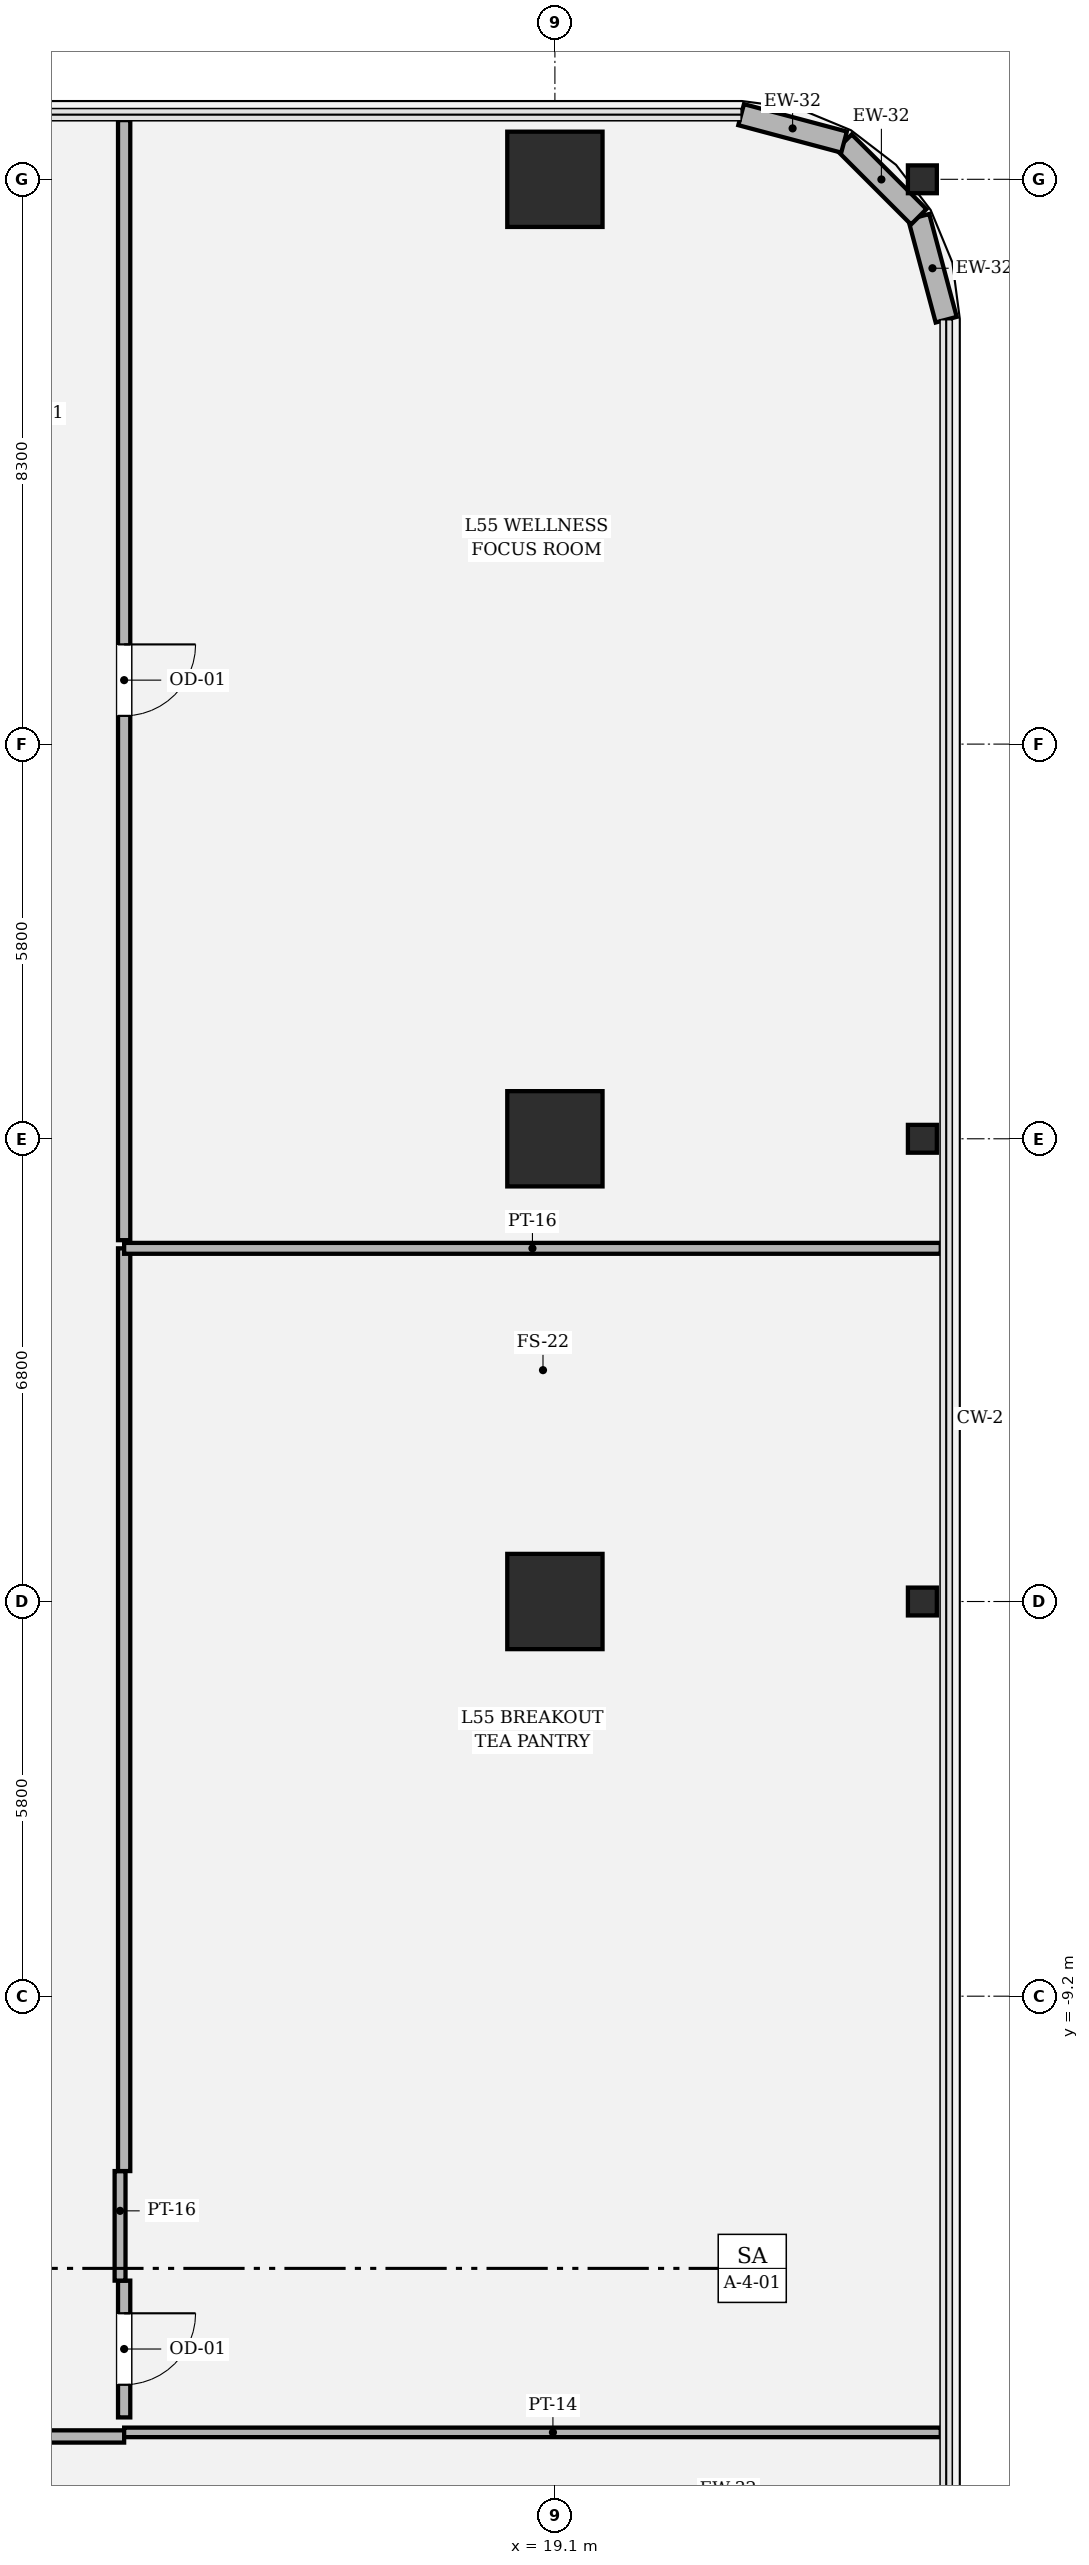
"""IFC4 building model, lengths in metres.
Left out: names, types, materials, properties, quantities, classifications, styles, units other than length and angle.
Written with IfcOpenShell. Run it as: python <this file> out.ifc"""

import sys

from ifc_helpers import new_model, si_unit, direction, frame, frame_2d, origin, origin_2d, place, context, subcontext, project, spatial, rectangle, hollow_rectangle, i_section, extrude, element, fill, save


model = new_model("IFC4")
c1 = context("Model", 3, precision=1e-05, world=origin(), true_north=direction((0.0, 1.0)))
c2 = subcontext(c1, "Body", "Model", "MODEL_VIEW")
j1 = project(units=[si_unit("LENGTHUNIT", "METRE"), si_unit("PLANEANGLEUNIT", "RADIAN")], contexts=[c1])
p1 = place(None, origin())
s1 = spatial("IfcSite", under=j1, at=p1, CompositionType="ELEMENT")
p2 = place(p1, origin())
s2 = spatial("IfcBuilding", under=s1, at=p2, CompositionType="ELEMENT")
p3 = place(p2, frame((0.0, 0.0, 232.95)))
s3 = spatial("IfcBuildingStorey", under=s2, at=p3, CompositionType="ELEMENT", Elevation=232.95)
for number, where, z_axis, x_axis in (
    (1, (19.1, -3.4, 0.0), (0.0, 0.0, 1.0), (1.0, 0.0, 0.0)),
    (2, (19.1, 3.4, 0.0), (0.0, 0.0, 1.0), (1.0, 0.0, 0.0)),
    (3, (19.1, 17.5, 0.0), (0.0, 0.0, 1.0), (1.0, 0.0, 0.0)),
):
    element("IfcColumn", number, at=place(p3, frame(where, z_axis=z_axis, x_axis=x_axis)), inside=s3, PredefinedType="COLUMN", context=c2, shape_type="SweptSolid", body=[
        extrude(hollow_rectangle(XDim=1.4, YDim=1.4, WallThickness=0.042, at=origin_2d()), origin(), (0.0, 0.0, 1.0), 4.05),
    ])
for number, where, z_axis, x_axis in (
    (4, (24.5, -3.4, 0.0), (0.0, 0.0, 1.0), (0.0, 1.0, 0.0)),
    (5, (24.5, 3.4, 0.0), (0.0, 0.0, 1.0), (0.0, 1.0, 0.0)),
    (6, (24.5, 17.5, 0.0), (0.0, 0.0, 1.0), (0.0, 1.0, 0.0)),
):
    element("IfcColumn", number, at=place(p3, frame(where, z_axis=z_axis, x_axis=x_axis)), inside=s3, PredefinedType="COLUMN", context=c2, shape_type="SweptSolid", body=[
        extrude(i_section(OverallWidth=0.409, OverallDepth=0.425, WebThickness=0.032, FlangeThickness=0.052, FilletRadius=0.018, at=origin_2d()), origin(), (0.0, 0.0, 1.0), 4.048),
    ])
p4 = place(p3, frame((24.85, 15.437, 0.0), z_axis=(0.0, 0.0, 1.0), x_axis=(-0.257847112249, 0.966185730957, 0.0)))
e7 = element("IfcWall", 7, at=p4, inside=s3, PredefinedType="SOLIDWALL", context=c2, shape_type="SweptSolid", body=[
    extrude(rectangle(XDim=1.565, YDim=0.32, at=frame_2d((0.783, 0.0))), origin(), (0.0, 0.0, 1.0), 3.73),
])
p5 = place(p3, frame((24.447, 16.949, 0.0), z_axis=(0.0, 0.0, 1.0), x_axis=(-0.707106781187, 0.707106781187, 0.0)))
e8 = element("IfcWall", 8, at=p5, inside=s3, PredefinedType="SOLIDWALL", context=c2, shape_type="SweptSolid", body=[
    extrude(rectangle(XDim=1.552, YDim=0.32, at=frame_2d((0.776, 0.0))), origin(), (0.0, 0.0, 1.0), 3.73),
])
p6 = place(p3, frame((23.349, 18.047, 0.0), z_axis=(0.0, 0.0, 1.0), x_axis=(-0.966224582397, 0.257701486942, 0.0)))
e9 = element("IfcWall", 9, at=p6, inside=s3, PredefinedType="SOLIDWALL", context=c2, shape_type="SweptSolid", body=[
    extrude(rectangle(XDim=1.565, YDim=0.32, at=frame_2d((0.783, 0.0))), origin(), (0.0, 0.0, 1.0), 3.73),
])
p7 = place(p3, frame((1.2, -15.67, 0.0), z_axis=(0.0, 0.0, 1.0), x_axis=(1.0, 0.0, 0.0)))
e10 = element("IfcWall", 10, at=p7, inside=s3, PredefinedType="PARTITIONING", context=c2, shape_type="SweptSolid", body=[
    extrude(rectangle(XDim=11.57, YDim=0.18, at=frame_2d((5.785, 0.0))), origin(), (0.0, 0.0, 1.0), 2.404),
])
p8 = place(p3, frame((12.77, -15.61, 0.0), z_axis=(0.0, 0.0, 1.0), x_axis=(1.0, 0.0, 0.0)))
e11 = element("IfcWall", 11, at=p8, inside=s3, PredefinedType="PARTITIONING", context=c2, shape_type="SweptSolid", body=[
    extrude(rectangle(XDim=12.0, YDim=0.14, at=frame_2d((6.0, 0.0))), origin(), (0.0, 0.0, 1.0), 2.404),
])
p9 = place(p3, frame((12.77, -15.39, 0.0), z_axis=(0.0, 0.0, 1.0), x_axis=(0.0, 1.0, 0.0)))
e12 = element("IfcWall", 12, at=p9, inside=s3, PredefinedType="PARTITIONING", context=c2, shape_type="SweptSolid", body=[
    extrude(rectangle(XDim=2.01, YDim=0.18, at=frame_2d((1.005, 0.0))), origin(), (0.0, 0.0, 1.0), 2.444),
])
p10 = place(p9, frame((0.48, 0.0, 0.0)))
e13 = element("IfcOpeningElement", 13, at=p10, cuts=e12, PredefinedType="OPENING", context=c2, shape_type="SweptSolid", body=[
    extrude(rectangle(XDim=1.05, YDim=2.2, at=frame_2d((0.525, 1.1))), frame((0.0, 0.1, 0.0), z_axis=(0.0, -1.0, 0.0), x_axis=(1.0, 0.0, 0.0)), (0.0, 0.0, 1.0), 0.2),
])
p11 = place(p3, frame((12.71, -13.38, 0.0), z_axis=(0.0, 0.0, 1.0), x_axis=(0.0, 1.0, 0.0)))
e14 = element("IfcWall", 14, at=p11, inside=s3, PredefinedType="PARTITIONING", context=c2, shape_type="SweptSolid", body=[
    extrude(rectangle(XDim=1.61, YDim=0.16, at=frame_2d((0.805, 0.0))), origin(), (0.0, 0.0, 1.0), 2.444),
])
p12 = place(p3, frame((12.77, -11.77, 0.0), z_axis=(0.0, 0.0, 1.0), x_axis=(0.0, 1.0, 0.0)))
e15 = element("IfcWall", 15, at=p12, inside=s3, PredefinedType="PARTITIONING", context=c2, shape_type="SweptSolid", body=[
    extrude(rectangle(XDim=13.56, YDim=0.18, at=frame_2d((6.78, 0.0))), origin(), (0.0, 0.0, 1.0), 2.404),
])
p13 = place(p3, frame((12.77, 1.79, 0.0), z_axis=(0.0, 0.0, 1.0), x_axis=(1.0, 0.0, 0.0)))
e16 = element("IfcWall", 16, at=p13, inside=s3, PredefinedType="PARTITIONING", context=c2, shape_type="SweptSolid", body=[
    extrude(rectangle(XDim=12.0, YDim=0.16, at=frame_2d((6.0, 0.0))), origin(), (0.0, 0.0, 1.0), 2.404),
])
p14 = place(p3, frame((12.77, 1.91, 0.0), z_axis=(0.0, 0.0, 1.0), x_axis=(0.0, 1.0, 0.0)))
e17 = element("IfcWall", 17, at=p14, inside=s3, PredefinedType="PARTITIONING", context=c2, shape_type="SweptSolid", body=[
    extrude(rectangle(XDim=16.46, YDim=0.18, at=frame_2d((8.23, 0.0))), origin(), (0.0, 0.0, 1.0), 2.404),
])
p15 = place(p14, frame((7.705, 0.0, 0.0)))
e18 = element("IfcOpeningElement", 18, at=p15, cuts=e17, PredefinedType="OPENING", context=c2, shape_type="SweptSolid", body=[
    extrude(rectangle(XDim=1.05, YDim=2.2, at=frame_2d((0.525, 1.1))), frame((0.0, 0.1, 0.0), z_axis=(0.0, -1.0, 0.0), x_axis=(1.0, 0.0, 0.0)), (0.0, 0.0, 1.0), 0.2),
])
p16 = place(p10, origin())
e19 = element("IfcDoor", 19, at=p16, inside=s3, OperationType="SINGLE_SWING_RIGHT", PredefinedType="DOOR", context=c2, shape_type="SweptSolid", body=[
    extrude(rectangle(XDim=1.05, YDim=2.2, at=frame_2d((0.525, 1.1))), frame((0.0, 0.025, 0.0), z_axis=(0.0, -1.0, 0.0), x_axis=(1.0, 0.0, 0.0)), (0.0, 0.0, 1.0), 0.05),
])
fill(e13, e19)
p17 = place(p15, origin())
e20 = element("IfcDoor", 20, at=p17, inside=s3, OperationType="SINGLE_SWING_RIGHT", PredefinedType="DOOR", context=c2, shape_type="SweptSolid", body=[
    extrude(rectangle(XDim=1.05, YDim=2.2, at=frame_2d((0.525, 1.1))), frame((0.0, 0.025, 0.0), z_axis=(0.0, -1.0, 0.0), x_axis=(1.0, 0.0, 0.0)), (0.0, 0.0, 1.0), 0.05),
])
fill(e18, e20)
save(model, sys.argv[1])
